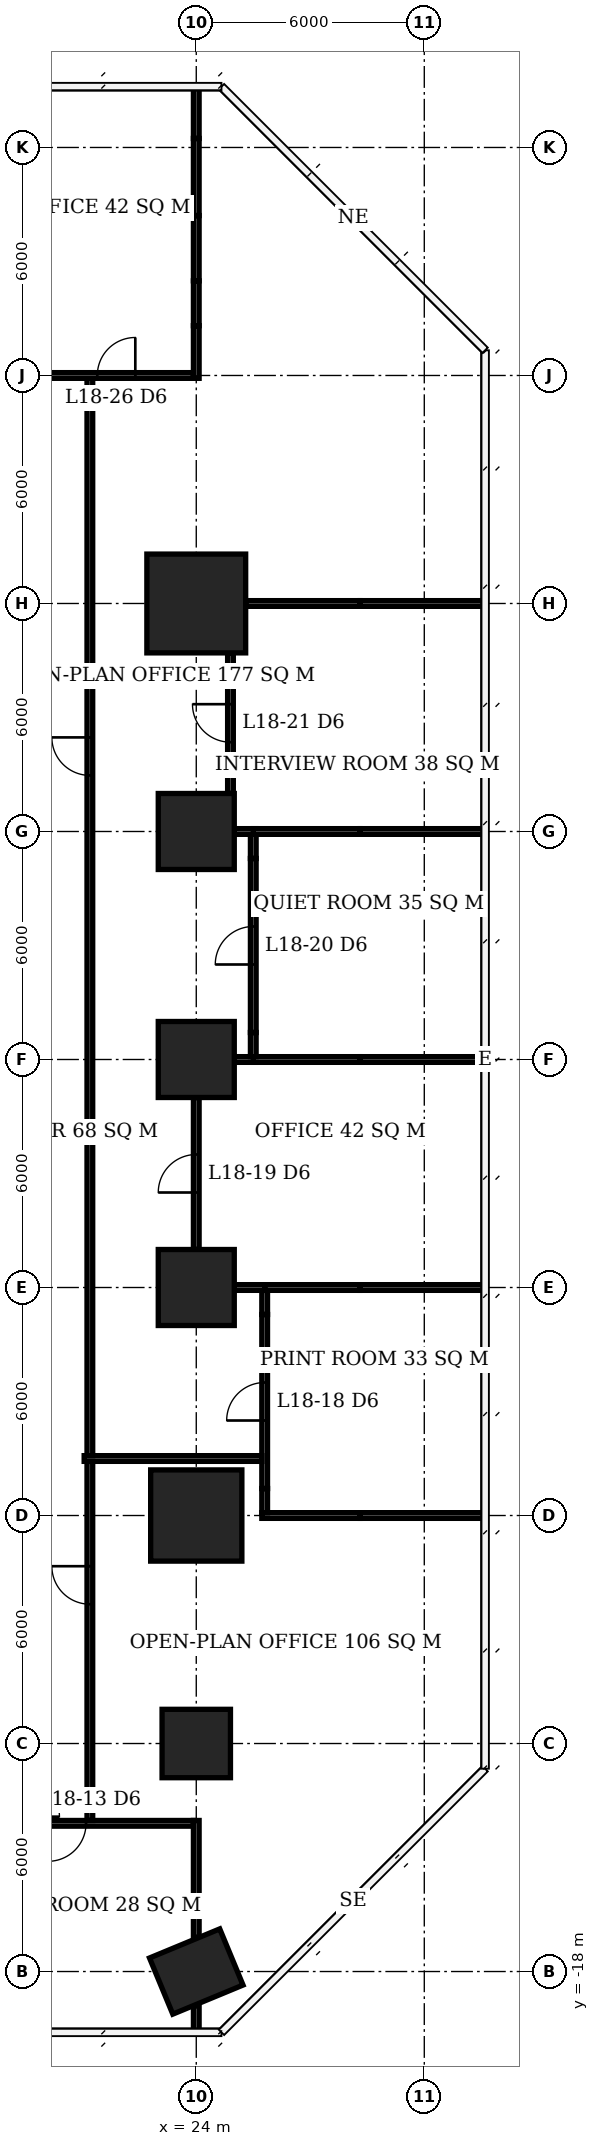
"""IFC4 building model, lengths in metres.
Left out: names, types, materials, properties, quantities, classifications, styles, units other than length and angle.
Written with IfcOpenShell. Run it as: python <this file> out.ifc"""

import sys

from ifc_helpers import new_model, si_unit, direction, frame, frame_2d, origin, origin_2d, place, context, subcontext, project, spatial, rectangle, extrude, element, fill, save


model = new_model("IFC4")
c1 = context("Model", 3, precision=1e-05, world=origin(), true_north=direction((0.0, 1.0)))
c2 = subcontext(c1, "Body", "Model", "MODEL_VIEW")
j1 = project(units=[si_unit("LENGTHUNIT", "METRE"), si_unit("PLANEANGLEUNIT", "RADIAN")], contexts=[c1])
p1 = place(None, origin())
s1 = spatial("IfcSite", under=j1, at=p1, CompositionType="ELEMENT")
p2 = place(p1, origin())
s2 = spatial("IfcBuilding", under=s1, at=p2, CompositionType="ELEMENT")
p3 = place(p2, frame((0.0, 0.0, 76.7)))
s3 = spatial("IfcBuildingStorey", under=s2, at=p3, CompositionType="ELEMENT", Elevation=76.7)
p4 = place(p3, frame((24.0, -18.0, 0.0), z_axis=(0.0, 0.0, 1.0), x_axis=(-0.923879532511, -0.382683432365, 0.0)))
e1 = element("IfcColumn", 1, at=p4, inside=s3, PredefinedType="COLUMN", context=c2, shape_type="SweptSolid", body=[
    extrude(rectangle(XDim=2.0, YDim=1.6, at=origin_2d()), origin(), (0.0, 0.0, 1.0), 3.9),
])
p5 = place(p3, frame((24.0, -12.0, 0.0), z_axis=(0.0, 0.0, 1.0), x_axis=(1.0, 0.0, 0.0)))
e2 = element("IfcColumn", 2, at=p5, inside=s3, PredefinedType="COLUMN", context=c2, shape_type="SweptSolid", body=[
    extrude(rectangle(XDim=1.8, YDim=1.8, at=origin_2d()), origin(), (0.0, 0.0, 1.0), 3.9),
])
p6 = place(p3, frame((24.0, -6.0, 0.0), z_axis=(0.0, 0.0, 1.0), x_axis=(1.0, 0.0, 0.0)))
e3 = element("IfcColumn", 3, at=p6, inside=s3, PredefinedType="COLUMN", context=c2, shape_type="SweptSolid", body=[
    extrude(rectangle(XDim=2.4, YDim=2.4, at=origin_2d()), origin(), (0.0, 0.0, 1.0), 3.9),
])
for number, where, z_axis, x_axis in (
    (4, (24.0, 0.0, 0.0), (0.0, 0.0, 1.0), (1.0, 0.0, 0.0)),
    (5, (24.0, 6.0, 0.0), (0.0, 0.0, 1.0), (1.0, 0.0, 0.0)),
    (6, (24.0, 12.0, 0.0), (0.0, 0.0, 1.0), (1.0, 0.0, 0.0)),
):
    element("IfcColumn", number, at=place(p3, frame(where, z_axis=z_axis, x_axis=x_axis)), inside=s3, PredefinedType="COLUMN", context=c2, shape_type="SweptSolid", body=[
        extrude(rectangle(XDim=2.0, YDim=2.0, at=origin_2d()), origin(), (0.0, 0.0, 1.0), 3.9),
    ])
p7 = place(p3, frame((24.0, 18.0, 0.0), z_axis=(0.0, 0.0, 1.0), x_axis=(1.0, 0.0, 0.0)))
e7 = element("IfcColumn", 7, at=p7, inside=s3, PredefinedType="COLUMN", context=c2, shape_type="SweptSolid", body=[
    extrude(rectangle(XDim=2.6, YDim=2.6, at=origin_2d()), origin(), (0.0, 0.0, 1.0), 3.9),
])
p8 = place(p3, frame((23.925, -14.1, 0.0), z_axis=(0.0, 0.0, 1.0), x_axis=(-1.0, 0.0, 0.0)))
e8 = element("IfcWall", 8, at=p8, inside=s3, PredefinedType="PARTITIONING", context=c2, shape_type="SweptSolid", body=[
    extrude(rectangle(XDim=5.85, YDim=0.15, at=frame_2d((2.925, 0.0))), origin(), (0.0, 0.0, 1.0), 3.65),
])
p9 = place(p8, frame((2.825, 0.0, 0.0)))
e9 = element("IfcOpeningElement", 9, at=p9, cuts=e8, PredefinedType="OPENING", context=c2, shape_type="SweptSolid", body=[
    extrude(rectangle(XDim=1.0, YDim=2.1, at=frame_2d((0.5, 1.05))), frame((0.0, 0.085, 0.0), z_axis=(0.0, -1.0, 0.0), x_axis=(1.0, 0.0, 0.0)), (0.0, 0.0, 1.0), 0.17),
])
p10 = place(p3, frame((25.725, -6.0, 0.0), z_axis=(0.0, 0.0, 1.0), x_axis=(1.0, 0.0, 0.0)))
e10 = element("IfcWall", 10, at=p10, inside=s3, PredefinedType="PARTITIONING", context=c2, shape_type="SweptSolid", body=[
    extrude(rectangle(XDim=2.585, YDim=0.15, at=frame_2d((1.292, 0.0))), origin(), (0.0, 0.0, 1.0), 2.65),
])
p11 = place(p3, frame((28.31, -6.0, 0.0), z_axis=(0.0, 0.0, 1.0), x_axis=(1.0, 0.0, 0.0)))
e11 = element("IfcWall", 11, at=p11, inside=s3, PredefinedType="PARTITIONING", context=c2, shape_type="SweptSolid", body=[
    extrude(rectangle(XDim=3.29, YDim=0.15, at=frame_2d((1.645, 0.0))), origin(), (0.0, 0.0, 1.0), 3.65),
])
p12 = place(p3, frame((25.0, 0.0, 0.0), z_axis=(0.0, 0.0, 1.0), x_axis=(1.0, 0.0, 0.0)))
e12 = element("IfcWall", 12, at=p12, inside=s3, PredefinedType="PARTITIONING", context=c2, shape_type="SweptSolid", body=[
    extrude(rectangle(XDim=0.875, YDim=0.15, at=frame_2d((0.438, 0.0))), origin(), (0.0, 0.0, 1.0), 2.65),
])
p13 = place(p3, frame((25.8, 0.0, 0.0), z_axis=(0.0, 0.0, 1.0), x_axis=(1.0, 0.0, 0.0)))
e13 = element("IfcWall", 13, at=p13, inside=s3, PredefinedType="PARTITIONING", context=c2, shape_type="SweptSolid", body=[
    extrude(rectangle(XDim=2.51, YDim=0.15, at=frame_2d((1.255, 0.0))), origin(), (0.0, 0.0, 1.0), 2.65),
])
p14 = place(p3, frame((28.31, 0.0, 0.0), z_axis=(0.0, 0.0, 1.0), x_axis=(1.0, 0.0, 0.0)))
e14 = element("IfcWall", 14, at=p14, inside=s3, PredefinedType="PARTITIONING", context=c2, shape_type="SweptSolid", body=[
    extrude(rectangle(XDim=3.29, YDim=0.15, at=frame_2d((1.645, 0.0))), origin(), (0.0, 0.0, 1.0), 3.65),
])
p15 = place(p3, frame((25.0, 6.0, 0.0), z_axis=(0.0, 0.0, 1.0), x_axis=(1.0, 0.0, 0.0)))
e15 = element("IfcWall", 15, at=p15, inside=s3, PredefinedType="PARTITIONING", context=c2, shape_type="SweptSolid", body=[
    extrude(rectangle(XDim=0.575, YDim=0.15, at=frame_2d((0.288, 0.0))), origin(), (0.0, 0.0, 1.0), 2.65),
])
p16 = place(p3, frame((25.5, 6.0, 0.0), z_axis=(0.0, 0.0, 1.0), x_axis=(1.0, 0.0, 0.0)))
e16 = element("IfcWall", 16, at=p16, inside=s3, PredefinedType="PARTITIONING", context=c2, shape_type="SweptSolid", body=[
    extrude(rectangle(XDim=2.81, YDim=0.15, at=frame_2d((1.405, 0.0))), origin(), (0.0, 0.0, 1.0), 2.65),
])
p17 = place(p3, frame((28.31, 6.0, 0.0), z_axis=(0.0, 0.0, 1.0), x_axis=(1.0, 0.0, 0.0)))
e17 = element("IfcWall", 17, at=p17, inside=s3, PredefinedType="PARTITIONING", context=c2, shape_type="SweptSolid", body=[
    extrude(rectangle(XDim=3.24, YDim=0.15, at=frame_2d((1.62, 0.0))), origin(), (0.0, 0.0, 1.0), 3.65),
])
p18 = place(p3, frame((25.0, 12.0, 0.0), z_axis=(0.0, 0.0, 1.0), x_axis=(1.0, 0.0, 0.0)))
e18 = element("IfcWall", 18, at=p18, inside=s3, PredefinedType="PARTITIONING", context=c2, shape_type="SweptSolid", body=[
    extrude(rectangle(XDim=0.575, YDim=0.15, at=frame_2d((0.288, 0.0))), origin(), (0.0, 0.0, 1.0), 2.65),
])
p19 = place(p3, frame((25.5, 12.0, 0.0), z_axis=(0.0, 0.0, 1.0), x_axis=(1.0, 0.0, 0.0)))
e19 = element("IfcWall", 19, at=p19, inside=s3, PredefinedType="PARTITIONING", context=c2, shape_type="SweptSolid", body=[
    extrude(rectangle(XDim=2.81, YDim=0.15, at=frame_2d((1.405, 0.0))), origin(), (0.0, 0.0, 1.0), 2.65),
])
p20 = place(p3, frame((28.31, 12.0, 0.0), z_axis=(0.0, 0.0, 1.0), x_axis=(1.0, 0.0, 0.0)))
e20 = element("IfcWall", 20, at=p20, inside=s3, PredefinedType="PARTITIONING", context=c2, shape_type="SweptSolid", body=[
    extrude(rectangle(XDim=3.29, YDim=0.15, at=frame_2d((1.645, 0.0))), origin(), (0.0, 0.0, 1.0), 3.65),
])
p21 = place(p3, frame((25.3, 18.0, 0.0), z_axis=(0.0, 0.0, 1.0), x_axis=(1.0, 0.0, 0.0)))
e21 = element("IfcWall", 21, at=p21, inside=s3, PredefinedType="PARTITIONING", context=c2, shape_type="SweptSolid", body=[
    extrude(rectangle(XDim=3.01, YDim=0.15, at=frame_2d((1.505, 0.0))), origin(), (0.0, 0.0, 1.0), 2.65),
])
p22 = place(p3, frame((28.31, 18.0, 0.0), z_axis=(0.0, 0.0, 1.0), x_axis=(1.0, 0.0, 0.0)))
e22 = element("IfcWall", 22, at=p22, inside=s3, PredefinedType="PARTITIONING", context=c2, shape_type="SweptSolid", body=[
    extrude(rectangle(XDim=3.29, YDim=0.15, at=frame_2d((1.645, 0.0))), origin(), (0.0, 0.0, 1.0), 3.65),
])
p23 = place(p3, frame((19.792, 24.0, 0.0), z_axis=(0.0, 0.0, 1.0), x_axis=(1.0, 0.0, 0.0)))
e23 = element("IfcWall", 23, at=p23, inside=s3, PredefinedType="PARTITIONING", context=c2, shape_type="SweptSolid", body=[
    extrude(rectangle(XDim=4.133, YDim=0.15, at=frame_2d((2.066, 0.0))), origin(), (0.0, 0.0, 1.0), 3.65),
])
p24 = place(p23, frame((1.604, 0.0, 0.0)))
e24 = element("IfcOpeningElement", 24, at=p24, cuts=e23, PredefinedType="OPENING", context=c2, shape_type="SweptSolid", body=[
    extrude(rectangle(XDim=1.0, YDim=2.1, at=frame_2d((0.5, 1.05))), frame((0.0, 0.085, 0.0), z_axis=(0.0, -1.0, 0.0), x_axis=(1.0, 0.0, 0.0)), (0.0, 0.0, 1.0), 0.17),
])
p25 = place(p3, frame((24.0, -19.6, 0.0), z_axis=(0.0, 0.0, 1.0), x_axis=(0.0, 1.0, 0.0)))
e25 = element("IfcWall", 25, at=p25, inside=s3, PredefinedType="PARTITIONING", context=c2, shape_type="SweptSolid", body=[
    extrude(rectangle(XDim=0.703, YDim=0.15, at=frame_2d((0.352, 0.0))), origin(), (0.0, 0.0, 1.0), 3.65),
])
p26 = place(p3, frame((24.0, -17.103, 0.0), z_axis=(0.0, 0.0, 1.0), x_axis=(0.0, 1.0, 0.0)))
e26 = element("IfcWall", 26, at=p26, inside=s3, PredefinedType="PARTITIONING", context=c2, shape_type="SweptSolid", body=[
    extrude(rectangle(XDim=3.078, YDim=0.15, at=frame_2d((1.539, 0.0))), origin(), (0.0, 0.0, 1.0), 3.65),
])
p27 = place(p3, frame((24.0, 1.0, 0.0), z_axis=(0.0, 0.0, 1.0), x_axis=(0.0, 1.0, 0.0)))
e27 = element("IfcWall", 27, at=p27, inside=s3, PredefinedType="PARTITIONING", context=c2, shape_type="SweptSolid", body=[
    extrude(rectangle(XDim=4.0, YDim=0.15, at=frame_2d((2.0, 0.0))), origin(), (0.0, 0.0, 1.0), 3.65),
])
p28 = place(p27, frame((1.5, 0.0, 0.0)))
e28 = element("IfcOpeningElement", 28, at=p28, cuts=e27, PredefinedType="OPENING", context=c2, shape_type="SweptSolid", body=[
    extrude(rectangle(XDim=1.0, YDim=2.1, at=frame_2d((0.5, 1.05))), frame((0.0, 0.085, 0.0), z_axis=(0.0, -1.0, 0.0), x_axis=(1.0, 0.0, 0.0)), (0.0, 0.0, 1.0), 0.17),
])
p29 = place(p3, frame((24.0, 23.925, 0.0), z_axis=(0.0, 0.0, 1.0), x_axis=(0.0, 1.0, 0.0)))
e29 = element("IfcWall", 29, at=p29, inside=s3, PredefinedType="PARTITIONING", context=c2, shape_type="SweptSolid", body=[
    extrude(rectangle(XDim=1.385, YDim=0.15, at=frame_2d((0.692, 0.0))), origin(), (0.0, 0.0, 1.0), 3.65),
])
p30 = place(p3, frame((24.0, 25.31, 0.0), z_axis=(0.0, 0.0, 1.0), x_axis=(0.0, 1.0, 0.0)))
e30 = element("IfcWall", 30, at=p30, inside=s3, PredefinedType="PARTITIONING", context=c2, shape_type="SweptSolid", body=[
    extrude(rectangle(XDim=1.18, YDim=0.15, at=frame_2d((0.59, 0.0))), origin(), (0.0, 0.0, 1.0), 2.65),
])
p31 = place(p3, frame((24.0, 26.49, 0.0), z_axis=(0.0, 0.0, 1.0), x_axis=(0.0, 1.0, 0.0)))
e31 = element("IfcWall", 31, at=p31, inside=s3, PredefinedType="PARTITIONING", context=c2, shape_type="SweptSolid", body=[
    extrude(rectangle(XDim=1.718, YDim=0.15, at=frame_2d((0.859, 0.0))), origin(), (0.0, 0.0, 1.0), 3.65),
])
p32 = place(p3, frame((24.0, 28.208, 0.0), z_axis=(0.0, 0.0, 1.0), x_axis=(0.0, 1.0, 0.0)))
e32 = element("IfcWall", 32, at=p32, inside=s3, PredefinedType="PARTITIONING", context=c2, shape_type="SweptSolid", body=[
    extrude(rectangle(XDim=2.029, YDim=0.15, at=frame_2d((1.015, 0.0))), origin(), (0.0, 0.0, 1.0), 2.65),
])
p33 = place(p3, frame((24.0, 30.237, 0.0), z_axis=(0.0, 0.0, 1.0), x_axis=(0.0, 1.0, 0.0)))
e33 = element("IfcWall", 33, at=p33, inside=s3, PredefinedType="PARTITIONING", context=c2, shape_type="SweptSolid", body=[
    extrude(rectangle(XDim=1.363, YDim=0.15, at=frame_2d((0.682, 0.0))), origin(), (0.0, 0.0, 1.0), 3.65),
])
p34 = place(p3, frame((24.9, 13.0, 0.0), z_axis=(0.0, 0.0, 1.0), x_axis=(0.0, 1.0, 0.0)))
e34 = element("IfcWall", 34, at=p34, inside=s3, PredefinedType="PARTITIONING", context=c2, shape_type="SweptSolid", body=[
    extrude(rectangle(XDim=3.7, YDim=0.15, at=frame_2d((1.85, 0.0))), origin(), (0.0, 0.0, 1.0), 3.65),
])
p35 = place(p34, frame((1.35, 0.0, 0.0)))
e35 = element("IfcOpeningElement", 35, at=p35, cuts=e34, PredefinedType="OPENING", context=c2, shape_type="SweptSolid", body=[
    extrude(rectangle(XDim=1.0, YDim=2.1, at=frame_2d((0.5, 1.05))), frame((0.0, 0.085, 0.0), z_axis=(0.0, -1.0, 0.0), x_axis=(1.0, 0.0, 0.0)), (0.0, 0.0, 1.0), 0.17),
])
p36 = place(p3, frame((25.5, 6.075, 0.0), z_axis=(0.0, 0.0, 1.0), x_axis=(0.0, 1.0, 0.0)))
e36 = element("IfcWall", 36, at=p36, inside=s3, PredefinedType="PARTITIONING", context=c2, shape_type="SweptSolid", body=[
    extrude(rectangle(XDim=0.635, YDim=0.15, at=frame_2d((0.317, 0.0))), origin(), (0.0, 0.0, 1.0), 2.65),
])
p37 = place(p3, frame((25.5, 6.71, 0.0), z_axis=(0.0, 0.0, 1.0), x_axis=(0.0, 1.0, 0.0)))
e37 = element("IfcWall", 37, at=p37, inside=s3, PredefinedType="PARTITIONING", context=c2, shape_type="SweptSolid", body=[
    extrude(rectangle(XDim=4.58, YDim=0.15, at=frame_2d((2.29, 0.0))), origin(), (0.0, 0.0, 1.0), 3.65),
])
p38 = place(p37, frame((1.79, 0.0, 0.0)))
e38 = element("IfcOpeningElement", 38, at=p38, cuts=e37, PredefinedType="OPENING", context=c2, shape_type="SweptSolid", body=[
    extrude(rectangle(XDim=1.0, YDim=2.1, at=frame_2d((0.5, 1.05))), frame((0.0, 0.085, 0.0), z_axis=(0.0, -1.0, 0.0), x_axis=(1.0, 0.0, 0.0)), (0.0, 0.0, 1.0), 0.17),
])
for number, where, z_axis, x_axis in (
    (39, (25.5, 11.29, 0.0), (0.0, 0.0, 1.0), (0.0, 1.0, 0.0)),
    (40, (25.8, -5.925, 0.0), (0.0, 0.0, 1.0), (0.0, 1.0, 0.0)),
):
    element("IfcWall", number, at=place(p3, frame(where, z_axis=z_axis, x_axis=x_axis)), inside=s3, PredefinedType="PARTITIONING", context=c2, shape_type="SweptSolid", body=[
        extrude(rectangle(XDim=0.635, YDim=0.15, at=frame_2d((0.317, 0.0))), origin(), (0.0, 0.0, 1.0), 2.65),
    ])
p39 = place(p3, frame((25.8, -5.29, 0.0), z_axis=(0.0, 0.0, 1.0), x_axis=(0.0, 1.0, 0.0)))
e41 = element("IfcWall", 41, at=p39, inside=s3, PredefinedType="PARTITIONING", context=c2, shape_type="SweptSolid", body=[
    extrude(rectangle(XDim=4.58, YDim=0.15, at=frame_2d((2.29, 0.0))), origin(), (0.0, 0.0, 1.0), 3.65),
])
p40 = place(p39, frame((1.79, 0.0, 0.0)))
e42 = element("IfcOpeningElement", 42, at=p40, cuts=e41, PredefinedType="OPENING", context=c2, shape_type="SweptSolid", body=[
    extrude(rectangle(XDim=1.0, YDim=2.1, at=frame_2d((0.5, 1.05))), frame((0.0, 0.085, 0.0), z_axis=(0.0, -1.0, 0.0), x_axis=(1.0, 0.0, 0.0)), (0.0, 0.0, 1.0), 0.17),
])
p41 = place(p3, frame((25.8, -0.71, 0.0), z_axis=(0.0, 0.0, 1.0), x_axis=(0.0, 1.0, 0.0)))
e43 = element("IfcWall", 43, at=p41, inside=s3, PredefinedType="PARTITIONING", context=c2, shape_type="SweptSolid", body=[
    extrude(rectangle(XDim=0.635, YDim=0.15, at=frame_2d((0.317, 0.0))), origin(), (0.0, 0.0, 1.0), 2.65),
])
p42 = place(p3, frame((21.2, -14.025, 0.0), z_axis=(0.0, 0.0, 1.0), x_axis=(0.0, 1.0, 0.0)))
e44 = element("IfcWall", 44, at=p42, inside=s3, PredefinedType="PARTITIONING", context=c2, shape_type="SweptSolid", body=[
    extrude(rectangle(XDim=9.45, YDim=0.15, at=frame_2d((4.725, 0.0))), origin(), (0.0, 0.0, 1.0), 3.65),
])
p43 = place(p42, frame((5.691, 0.0, 0.0)))
e45 = element("IfcOpeningElement", 45, at=p43, cuts=e44, PredefinedType="OPENING", context=c2, shape_type="SweptSolid", body=[
    extrude(rectangle(XDim=1.0, YDim=2.1, at=frame_2d((0.5, 1.05))), frame((0.0, 0.085, 0.0), z_axis=(0.0, -1.0, 0.0), x_axis=(1.0, 0.0, 0.0)), (0.0, 0.0, 1.0), 0.17),
])
p44 = place(p3, frame((21.2, -4.425, 0.0), z_axis=(0.0, 0.0, 1.0), x_axis=(0.0, 1.0, 0.0)))
e46 = element("IfcWall", 46, at=p44, inside=s3, PredefinedType="PARTITIONING", context=c2, shape_type="SweptSolid", body=[
    extrude(rectangle(XDim=28.35, YDim=0.15, at=frame_2d((14.175, 0.0))), origin(), (0.0, 0.0, 1.0), 3.65),
])
p45 = place(p44, frame((17.901, 0.0, 0.0)))
e47 = element("IfcOpeningElement", 47, at=p45, cuts=e46, PredefinedType="OPENING", context=c2, shape_type="SweptSolid", body=[
    extrude(rectangle(XDim=1.0, YDim=2.1, at=frame_2d((0.5, 1.05))), frame((0.0, 0.085, 0.0), z_axis=(0.0, -1.0, 0.0), x_axis=(1.0, 0.0, 0.0)), (0.0, 0.0, 1.0), 0.17),
])
p46 = place(p3, frame((21.05, -4.5, 0.0), z_axis=(0.0, 0.0, 1.0), x_axis=(1.0, 0.0, 0.0)))
e48 = element("IfcWall", 48, at=p46, inside=s3, PredefinedType="PARTITIONING", context=c2, shape_type="SweptSolid", body=[
    extrude(rectangle(XDim=4.675, YDim=0.15, at=frame_2d((2.337, 0.0))), origin(), (0.0, 0.0, 1.0), 3.65),
])
p47 = place(p9, origin())
e49 = element("IfcDoor", 49, at=p47, inside=s3, OperationType="SINGLE_SWING_RIGHT", PredefinedType="DOOR", context=c2, shape_type="SweptSolid", body=[
    extrude(rectangle(XDim=1.0, YDim=2.1, at=frame_2d((0.5, 1.05))), frame((0.0, 0.025, 0.0), z_axis=(0.0, -1.0, 0.0), x_axis=(1.0, 0.0, 0.0)), (0.0, 0.0, 1.0), 0.05),
])
fill(e9, e49)
p48 = place(p40, origin())
e50 = element("IfcDoor", 50, at=p48, inside=s3, OperationType="SINGLE_SWING_LEFT", PredefinedType="DOOR", context=c2, shape_type="SweptSolid", body=[
    extrude(rectangle(XDim=1.0, YDim=2.1, at=frame_2d((0.5, 1.05))), frame((0.0, 0.025, 0.0), z_axis=(0.0, -1.0, 0.0), x_axis=(1.0, 0.0, 0.0)), (0.0, 0.0, 1.0), 0.05),
])
fill(e42, e50)
p49 = place(p28, origin())
e51 = element("IfcDoor", 51, at=p49, inside=s3, OperationType="SINGLE_SWING_LEFT", PredefinedType="DOOR", context=c2, shape_type="SweptSolid", body=[
    extrude(rectangle(XDim=1.0, YDim=2.1, at=frame_2d((0.5, 1.05))), frame((0.0, 0.025, 0.0), z_axis=(0.0, -1.0, 0.0), x_axis=(1.0, 0.0, 0.0)), (0.0, 0.0, 1.0), 0.05),
])
fill(e28, e51)
p50 = place(p38, origin())
e52 = element("IfcDoor", 52, at=p50, inside=s3, OperationType="SINGLE_SWING_LEFT", PredefinedType="DOOR", context=c2, shape_type="SweptSolid", body=[
    extrude(rectangle(XDim=1.0, YDim=2.1, at=frame_2d((0.5, 1.05))), frame((0.0, 0.025, 0.0), z_axis=(0.0, -1.0, 0.0), x_axis=(1.0, 0.0, 0.0)), (0.0, 0.0, 1.0), 0.05),
])
fill(e38, e52)
p51 = place(p35, origin())
e53 = element("IfcDoor", 53, at=p51, inside=s3, OperationType="SINGLE_SWING_RIGHT", PredefinedType="DOOR", context=c2, shape_type="SweptSolid", body=[
    extrude(rectangle(XDim=1.0, YDim=2.1, at=frame_2d((0.5, 1.05))), frame((0.0, 0.025, 0.0), z_axis=(0.0, -1.0, 0.0), x_axis=(1.0, 0.0, 0.0)), (0.0, 0.0, 1.0), 0.05),
])
fill(e35, e53)
p52 = place(p24, origin())
e54 = element("IfcDoor", 54, at=p52, inside=s3, OperationType="SINGLE_SWING_RIGHT", PredefinedType="DOOR", context=c2, shape_type="SweptSolid", body=[
    extrude(rectangle(XDim=1.0, YDim=2.1, at=frame_2d((0.5, 1.05))), frame((0.0, 0.025, 0.0), z_axis=(0.0, -1.0, 0.0), x_axis=(1.0, 0.0, 0.0)), (0.0, 0.0, 1.0), 0.05),
])
fill(e24, e54)
p53 = place(p43, origin())
e55 = element("IfcDoor", 55, at=p53, inside=s3, OperationType="SINGLE_SWING_RIGHT", PredefinedType="DOOR", context=c2, shape_type="SweptSolid", body=[
    extrude(rectangle(XDim=1.0, YDim=2.1, at=frame_2d((0.5, 1.05))), frame((0.0, 0.025, 0.0), z_axis=(0.0, -1.0, 0.0), x_axis=(1.0, 0.0, 0.0)), (0.0, 0.0, 1.0), 0.05),
])
fill(e45, e55)
p54 = place(p45, origin())
e56 = element("IfcDoor", 56, at=p54, inside=s3, OperationType="SINGLE_SWING_RIGHT", PredefinedType="DOOR", context=c2, shape_type="SweptSolid", body=[
    extrude(rectangle(XDim=1.0, YDim=2.1, at=frame_2d((0.5, 1.05))), frame((0.0, 0.025, 0.0), z_axis=(0.0, -1.0, 0.0), x_axis=(1.0, 0.0, 0.0)), (0.0, 0.0, 1.0), 0.05),
])
fill(e47, e56)
save(model, sys.argv[1])
